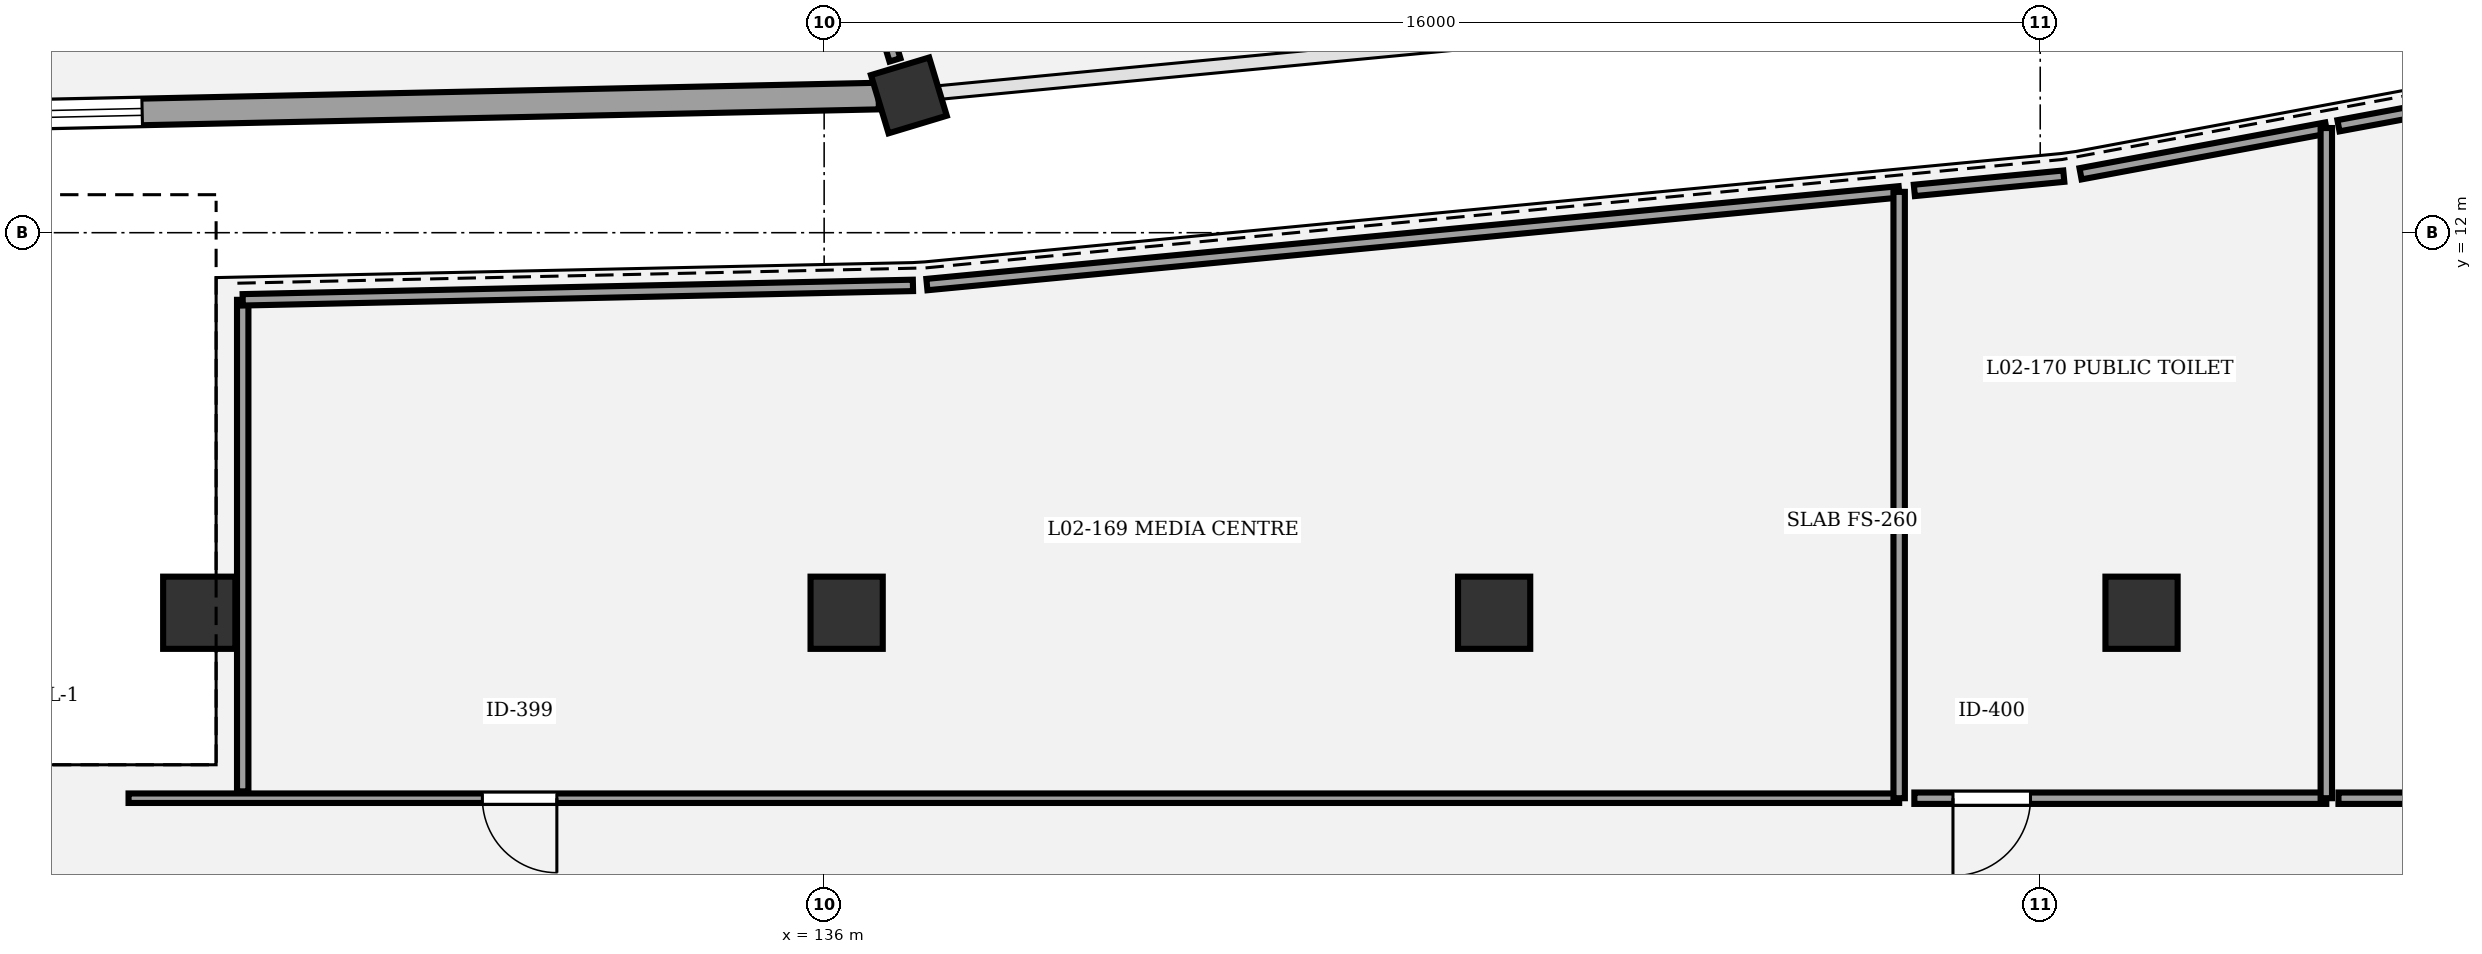
"""IFC4 building model, lengths in metres.
Left out: names, types, materials, properties, quantities, classifications, styles, units other than length and angle.
Written with IfcOpenShell. Run it as: python <this file> out.ifc"""

import sys

from ifc_helpers import new_model, si_unit, direction, frame, frame_2d, origin, origin_2d, place, context, subcontext, project, spatial, rectangle, circle, extrude, element, fill, save


model = new_model("IFC4")
c1 = context("Model", 3, precision=1e-05, world=origin(), true_north=direction((0.0, 1.0)))
c2 = subcontext(c1, "Body", "Model", "MODEL_VIEW")
j1 = project(units=[si_unit("LENGTHUNIT", "METRE"), si_unit("PLANEANGLEUNIT", "RADIAN")], contexts=[c1])
p1 = place(None, origin())
s1 = spatial("IfcSite", under=j1, at=p1, CompositionType="ELEMENT")
p2 = place(p1, origin())
s2 = spatial("IfcBuilding", under=s1, at=p2, CompositionType="ELEMENT")
p3 = place(p2, frame((0.0, 0.0, 10.2)))
s3 = spatial("IfcBuildingStorey", under=s2, at=p3, CompositionType="ELEMENT", Elevation=10.2)
p4 = place(p3, frame((137.115, 13.806, 0.0), z_axis=(0.0, 0.0, 1.0), x_axis=(0.289198876314, -0.957269037387, 0.0)))
e1 = element("IfcColumn", 1, at=p4, inside=s3, PredefinedType="COLUMN", context=c2, shape_type="SweptSolid", body=[
    extrude(rectangle(XDim=0.8, YDim=0.8, at=origin_2d()), origin(), (0.0, 0.0, 1.0), 4.5),
])
for number, where, z_axis, x_axis in (
    (2, (127.778, 7.0, 0.0), (0.0, 0.0, 1.0), (1.0, 0.0, 0.0)),
    (3, (136.296, 7.0, 0.0), (0.0, 0.0, 1.0), (1.0, 0.0, 0.0)),
    (4, (144.815, 7.0, 0.0), (0.0, 0.0, 1.0), (1.0, 0.0, 0.0)),
    (5, (153.333, 7.0, 0.0), (0.0, 0.0, 1.0), (1.0, 0.0, 0.0)),
):
    element("IfcColumn", number, at=place(p3, frame(where, z_axis=z_axis, x_axis=x_axis)), inside=s3, PredefinedType="COLUMN", context=c2, shape_type="SweptSolid", body=[
        extrude(circle(Radius=0.475, at=origin_2d()), origin(), (0.0, 0.0, 1.0), 4.5),
    ])
p5 = place(p3, frame((115.398, 13.339, 0.0), z_axis=(0.0, 0.0, 1.0), x_axis=(0.999768320606, 0.021524523519, 0.0)))
e6 = element("IfcWall", 6, at=p5, inside=s3, PredefinedType="STANDARD", context=c2, shape_type="SweptSolid", body=[
    extrude(rectangle(XDim=21.324, YDim=0.35, at=frame_2d((10.662, 0.0))), origin(), (0.0, 0.0, 1.0), 3.42),
])
p6 = place(p5, frame((9.692, 0.0, 0.9)))
e7 = element("IfcOpeningElement", 7, at=p6, cuts=e6, PredefinedType="OPENING", context=c2, shape_type="SweptSolid", body=[
    extrude(rectangle(XDim=1.94, YDim=1.95, at=frame_2d((0.97, 0.975))), frame((0.0, 0.185, 0.0), z_axis=(0.0, -1.0, 0.0), x_axis=(1.0, 0.0, 0.0)), (0.0, 0.0, 1.0), 0.37),
])
p7 = place(p3, frame((150.144, 4.56, 0.0), z_axis=(0.0, 0.0, 1.0), x_axis=(-1.0, 0.0, 0.0)))
e8 = element("IfcWall", 8, at=p7, inside=s3, PredefinedType="PARTITIONING", context=c2, shape_type="SweptSolid", body=[
    extrude(rectangle(XDim=23.296, YDim=0.125, at=frame_2d((11.648, 0.0))), origin(), (0.0, 0.0, 1.0), 3.25),
])
p8 = place(p7, frame((17.661, 0.0, 0.0)))
e9 = element("IfcOpeningElement", 9, at=p8, cuts=e8, PredefinedType="OPENING", context=c2, shape_type="SweptSolid", body=[
    extrude(rectangle(XDim=0.98, YDim=2.1, at=frame_2d((0.49, 1.05))), frame((0.0, 0.073, 0.0), z_axis=(0.0, -1.0, 0.0), x_axis=(1.0, 0.0, 0.0)), (0.0, 0.0, 1.0), 0.145),
])
p9 = place(p3, frame((155.764, 4.56, 0.0), z_axis=(0.0, 0.0, 1.0), x_axis=(-1.0, 0.0, 0.0)))
e10 = element("IfcWall", 10, at=p9, inside=s3, PredefinedType="PARTITIONING", context=c2, shape_type="SweptSolid", body=[
    extrude(rectangle(XDim=5.42, YDim=0.15, at=frame_2d((2.71, 0.0))), origin(), (0.0, 0.0, 1.0), 3.25),
])
p10 = place(p9, frame((3.892, 0.0, 0.0)))
e11 = element("IfcOpeningElement", 11, at=p10, cuts=e10, PredefinedType="OPENING", context=c2, shape_type="SweptSolid", body=[
    extrude(rectangle(XDim=1.02, YDim=2.1, at=frame_2d((0.51, 1.05))), frame((0.0, 0.085, 0.0), z_axis=(0.0, -1.0, 0.0), x_axis=(1.0, 0.0, 0.0)), (0.0, 0.0, 1.0), 0.17),
])
p11 = place(p3, frame((173.64, 4.56, 0.0), z_axis=(0.0, 0.0, 1.0), x_axis=(-1.0, 0.0, 0.0)))
e12 = element("IfcWall", 12, at=p11, inside=s3, PredefinedType="PARTITIONING", context=c2, shape_type="SweptSolid", body=[
    extrude(rectangle(XDim=17.716, YDim=0.15, at=frame_2d((8.858, 0.0))), origin(), (0.0, 0.0, 1.0), 3.25),
])
p12 = place(p11, frame((15.535, 0.0, 0.0)))
e13 = element("IfcOpeningElement", 13, at=p12, cuts=e12, PredefinedType="OPENING", context=c2, shape_type="SweptSolid", body=[
    extrude(rectangle(XDim=1.06, YDim=2.1, at=frame_2d((0.53, 1.05))), frame((0.0, 0.085, 0.0), z_axis=(0.0, -1.0, 0.0), x_axis=(1.0, 0.0, 0.0)), (0.0, 0.0, 1.0), 0.17),
])
p13 = place(p3, frame((135.249, 19.842, 0.0), z_axis=(0.0, 0.0, 1.0), x_axis=(0.289195444178, -0.957270074256, 0.0)))
e14 = element("IfcWall", 14, at=p13, inside=s3, PredefinedType="PARTITIONING", context=c2, shape_type="SweptSolid", body=[
    extrude(rectangle(XDim=5.817, YDim=0.15, at=frame_2d((2.909, 0.0))), origin(), (0.0, 0.0, 1.0), 3.25),
])
p14 = place(p3, frame((128.35, 4.65, 0.0), z_axis=(0.0, 0.0, 1.0), x_axis=(0.0, 1.0, 0.0)))
e15 = element("IfcWall", 15, at=p14, inside=s3, PredefinedType="PARTITIONING", context=c2, shape_type="SweptSolid", body=[
    extrude(rectangle(XDim=6.467, YDim=0.15, at=frame_2d((3.233, 0.0))), origin(), (0.0, 0.0, 1.0), 3.25),
])
p15 = place(p3, frame((128.35, 11.117, 0.0), z_axis=(0.0, 0.0, 1.0), x_axis=(0.999768109674, 0.021534318641, 0.0)))
e16 = element("IfcWall", 16, at=p15, inside=s3, PredefinedType="PARTITIONING", context=c2, shape_type="SweptSolid", body=[
    extrude(rectangle(XDim=8.82, YDim=0.15, at=frame_2d((4.41, 0.0))), origin(), (0.0, 0.0, 1.0), 3.25),
])
p16 = place(p3, frame((137.352, 11.317, 0.0), z_axis=(0.0, 0.0, 1.0), x_axis=(0.995483253835, 0.094937302124, 0.0)))
e17 = element("IfcWall", 17, at=p16, inside=s3, PredefinedType="PARTITIONING", context=c2, shape_type="SweptSolid", body=[
    extrude(rectangle(XDim=12.85, YDim=0.15, at=frame_2d((6.425, 0.0))), origin(), (0.0, 0.0, 1.0), 3.25),
])
p17 = place(p3, frame((150.144, 12.537, 0.0), z_axis=(0.0, 0.0, 1.0), x_axis=(0.0, -1.0, 0.0)))
e18 = element("IfcWall", 18, at=p17, inside=s3, PredefinedType="PARTITIONING", context=c2, shape_type="SweptSolid", body=[
    extrude(rectangle(XDim=7.977, YDim=0.15, at=frame_2d((3.989, 0.0))), origin(), (0.0, 0.0, 1.0), 3.25),
])
p18 = place(p3, frame((152.531, 12.775, 0.0), z_axis=(0.0, 0.0, 1.0), x_axis=(0.983089981796, 0.18312314898, 0.0)))
e19 = element("IfcWall", 19, at=p18, inside=s3, PredefinedType="PARTITIONING", context=c2, shape_type="SweptSolid", body=[
    extrude(rectangle(XDim=3.289, YDim=0.15, at=frame_2d((1.645, 0.0))), origin(), (0.0, 0.0, 1.0), 3.25),
])
p19 = place(p3, frame((155.764, 13.377, 0.0), z_axis=(0.0, 0.0, 1.0), x_axis=(0.0, -1.0, 0.0)))
e20 = element("IfcWall", 20, at=p19, inside=s3, PredefinedType="PARTITIONING", context=c2, shape_type="SweptSolid", body=[
    extrude(rectangle(XDim=8.817, YDim=0.15, at=frame_2d((4.409, 0.0))), origin(), (0.0, 0.0, 1.0), 3.25),
])
p20 = place(p3, frame((150.344, 12.556, 0.0), z_axis=(0.0, 0.0, 1.0), x_axis=(0.995483241572, 0.094937430712, 0.0)))
e21 = element("IfcWall", 21, at=p20, inside=s3, PredefinedType="PARTITIONING", context=c2, shape_type="SweptSolid", body=[
    extrude(rectangle(XDim=1.975, YDim=0.15, at=frame_2d((0.988, 0.0))), origin(), (0.0, 0.0, 1.0), 3.25),
])
p21 = place(p3, frame((155.924, 13.407, 0.0), z_axis=(0.0, 0.0, 1.0), x_axis=(0.983095301178, 0.183094589766, 0.0)))
e22 = element("IfcWall", 22, at=p21, inside=s3, PredefinedType="PARTITIONING", context=c2, shape_type="SweptSolid", body=[
    extrude(rectangle(XDim=9.495, YDim=0.15, at=frame_2d((4.748, 0.0))), origin(), (0.0, 0.0, 1.0), 3.25),
])
p22 = place(p6, origin())
e23 = element("IfcWindow", 23, at=p22, inside=s3, PartitioningType="SINGLE_PANEL", PredefinedType="WINDOW", context=c2, shape_type="SweptSolid", body=[
    extrude(rectangle(XDim=1.94, YDim=1.95, at=frame_2d((0.97, 0.975))), frame((0.0, 0.03, 0.0), z_axis=(0.0, -1.0, 0.0), x_axis=(1.0, 0.0, 0.0)), (0.0, 0.0, 1.0), 0.06),
])
fill(e7, e23)
p23 = place(p8, origin())
e24 = element("IfcDoor", 24, at=p23, inside=s3, OperationType="SINGLE_SWING_LEFT", PredefinedType="DOOR", context=c2, shape_type="SweptSolid", body=[
    extrude(rectangle(XDim=0.98, YDim=2.1, at=frame_2d((0.49, 1.05))), frame((0.0, 0.025, 0.0), z_axis=(0.0, -1.0, 0.0), x_axis=(1.0, 0.0, 0.0)), (0.0, 0.0, 1.0), 0.05),
])
fill(e9, e24)
p24 = place(p10, origin())
e25 = element("IfcDoor", 25, at=p24, inside=s3, OperationType="SINGLE_SWING_RIGHT", PredefinedType="DOOR", context=c2, shape_type="SweptSolid", body=[
    extrude(rectangle(XDim=1.02, YDim=2.1, at=frame_2d((0.51, 1.05))), frame((0.0, 0.025, 0.0), z_axis=(0.0, -1.0, 0.0), x_axis=(1.0, 0.0, 0.0)), (0.0, 0.0, 1.0), 0.05),
])
fill(e11, e25)
save(model, sys.argv[1])
